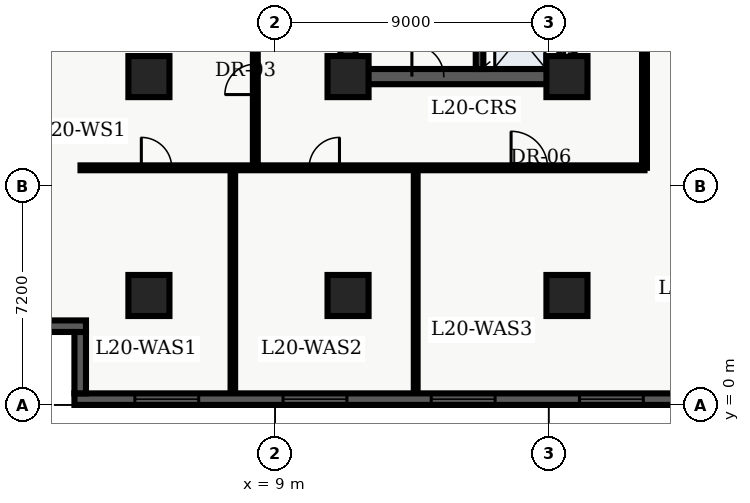
"""IFC4 building model, lengths in metres.
Left out: names, types, materials, properties, quantities, classifications, styles, units other than length and angle.
Written with IfcOpenShell. Run it as: python <this file> out.ifc"""

import sys

from ifc_helpers import new_model, entity, si_unit, converted_unit, direction, frame, origin_with_axes, origin_2d_with_axis, place, context, subcontext, project, spatial, polyline, rectangle, outline, extrude, element, fill, save


model = new_model("IFC4")
c1 = context("Model", 3, precision=1e-05, world=origin_with_axes(), true_north=direction((0.0, 1.0)))
c2 = subcontext(c1, "Body", "Model", "MODEL_VIEW")
j1 = project(units=[si_unit("LENGTHUNIT", "METRE"), converted_unit("PLANEANGLEUNIT", "DEGREE", entity("IfcPlaneAngleMeasure", 0.017), si_unit("PLANEANGLEUNIT", "RADIAN"), dimensions=[0, 0, 0, 0, 0, 0, 0])], contexts=[c1])
p1 = place(None, origin_with_axes())
s1 = spatial("IfcSite", under=j1, at=p1, CompositionType="ELEMENT")
p2 = place(p1, origin_with_axes())
s2 = spatial("IfcBuilding", under=s1, at=p2, CompositionType="ELEMENT")
p3 = place(p2, frame((0.0, 0.0, 84.6), z_axis=(0.0, 0.0, 1.0), x_axis=(1.0, 0.0, 0.0)))
s3 = spatial("IfcBuildingStorey", under=s2, at=p3, CompositionType="ELEMENT", Elevation=84.6)
p4 = place(p3, frame((11.4, 10.8, 0.0), z_axis=(0.0, 0.0, 1.0), x_axis=(0.0, 1.0, 0.0)))
e1 = element("IfcWall", 1, at=p4, inside=s3, PredefinedType="SHEAR", context=c2, shape_type="SweptSolid", body=[
    extrude(outline(polyline([(0.0, -0.25), (27.0, -0.25), (27.0, 0.25), (0.0, 0.25), (0.0, -0.25)])), origin_with_axes(), (0.0, 0.0, 1.0), 4.26),
])
p5 = place(p3, frame((11.4, 10.8, 0.0), z_axis=(0.0, 0.0, 1.0), x_axis=(1.0, 0.0, 0.0)))
e2 = element("IfcWall", 2, at=p5, inside=s3, PredefinedType="SHEAR", context=c2, shape_type="SweptSolid", body=[
    extrude(outline(polyline([(0.0, -0.25), (7.2, -0.25), (7.2, 0.25), (0.0, 0.25), (0.0, -0.25)])), origin_with_axes(), (0.0, 0.0, 1.0), 4.26),
])
p6 = place(p5, frame((2.625, 0.0, 0.0), z_axis=(0.0, 0.0, 1.0), x_axis=(1.0, 0.0, 0.0)))
e3 = element("IfcOpeningElement", 3, at=p6, cuts=e2, PredefinedType="OPENING", context=c2, shape_type="SweptSolid", body=[
    extrude(rectangle(XDim=1.05, YDim=0.52, at=origin_2d_with_axis()), origin_with_axes(), (0.0, 0.0, 1.0), 2.15),
])
p7 = place(p3, frame((18.6, 10.8, 0.0), z_axis=(0.0, 0.0, 1.0), x_axis=(0.0, 1.0, 0.0)))
e4 = element("IfcWall", 4, at=p7, inside=s3, PredefinedType="SHEAR", context=c2, shape_type="SweptSolid", body=[
    extrude(outline(polyline([(0.0, -0.25), (13.5, -0.25), (13.5, 0.25), (0.0, 0.25), (0.0, -0.25)])), origin_with_axes(), (0.0, 0.0, 1.0), 4.26),
])
p8 = place(p7, frame((1.3, 0.0, 0.0), z_axis=(0.0, 0.0, 1.0), x_axis=(1.0, 0.0, 0.0)))
e5 = element("IfcOpeningElement", 5, at=p8, cuts=e4, PredefinedType="OPENING", context=c2, shape_type="SweptSolid", body=[
    extrude(rectangle(XDim=1.1, YDim=0.52, at=origin_2d_with_axis()), origin_with_axes(), (0.0, 0.0, 1.0), 2.15),
])
p9 = place(p7, frame((3.4, 0.0, 0.0), z_axis=(0.0, 0.0, 1.0), x_axis=(1.0, 0.0, 0.0)))
e6 = element("IfcOpeningElement", 6, at=p9, cuts=e4, PredefinedType="OPENING", context=c2, shape_type="SweptSolid", body=[
    extrude(rectangle(XDim=1.1, YDim=0.52, at=origin_2d_with_axis()), origin_with_axes(), (0.0, 0.0, 1.0), 2.15),
])
p10 = place(p7, frame((11.125, 0.0, 0.0), z_axis=(0.0, 0.0, 1.0), x_axis=(1.0, 0.0, 0.0)))
e7 = element("IfcOpeningElement", 7, at=p10, cuts=e4, PredefinedType="OPENING", context=c2, shape_type="SweptSolid", body=[
    extrude(rectangle(XDim=1.05, YDim=0.52, at=origin_2d_with_axis()), origin_with_axes(), (0.0, 0.0, 1.0), 2.15),
])
p11 = place(p3, frame((15.725, 11.05, 0.0), z_axis=(0.0, 0.0, 1.0), x_axis=(0.0, 1.0, 0.0)))
e8 = element("IfcWall", 8, at=p11, inside=s3, PredefinedType="SHEAR", context=c2, shape_type="SweptSolid", body=[
    extrude(outline(polyline([(0.0, -0.125), (8.65, -0.125), (8.65, 0.125), (0.0, 0.125), (0.0, -0.125)])), origin_with_axes(), (0.0, 0.0, 1.0), 4.26),
])
for number, where, z_axis, x_axis in (
    (9, (11.4, 3.6, 0.0), (0.0, 0.0, 1.0), (1.0, 0.0, 0.0)),
    (10, (11.4, 10.8, 0.0), (0.0, 0.0, 1.0), (1.0, 0.0, 0.0)),
    (11, (18.6, 3.6, 0.0), (0.0, 0.0, 1.0), (1.0, 0.0, 0.0)),
    (12, (18.6, 10.8, 0.0), (0.0, 0.0, 1.0), (1.0, 0.0, 0.0)),
    (13, (4.85, 3.6, 0.0), (0.0, 0.0, 1.0), (1.0, 0.0, 0.0)),
    (14, (4.85, 10.8, 0.0), (0.0, 0.0, 1.0), (1.0, 0.0, 0.0)),
):
    element("IfcColumn", number, at=place(p3, frame(where, z_axis=z_axis, x_axis=x_axis)), inside=s3, PredefinedType="COLUMN", context=c2, shape_type="SweptSolid", body=[
        extrude(rectangle(XDim=1.35, YDim=1.35, at=origin_2d_with_axis()), origin_with_axes(), (0.0, 0.0, 1.0), 4.5),
    ])
p12 = place(p3, frame((2.6, 7.8, 0.0), z_axis=(0.0, 0.0, 1.0), x_axis=(1.0, 0.0, 0.0)))
e15 = element("IfcWall", 15, at=p12, inside=s3, PredefinedType="PARTITIONING", context=c2, shape_type="SweptSolid", body=[
    extrude(outline(polyline([(0.0, -0.08), (18.55, -0.08), (18.55, 0.08), (0.0, 0.08), (0.0, -0.08)])), origin_with_axes(), (0.0, 0.0, 1.0), 3.2),
])
p13 = place(p12, frame((2.501, 0.0, 0.0), z_axis=(0.0, 0.0, 1.0), x_axis=(1.0, 0.0, 0.0)))
e16 = element("IfcOpeningElement", 16, at=p13, cuts=e15, PredefinedType="OPENING", context=c2, shape_type="SweptSolid", body=[
    extrude(rectangle(XDim=1.0, YDim=0.18, at=origin_2d_with_axis()), origin_with_axes(), (0.0, 0.0, 1.0), 2.15),
])
p14 = place(p12, frame((8.018, 0.0, 0.0), z_axis=(0.0, 0.0, 1.0), x_axis=(1.0, 0.0, 0.0)))
e17 = element("IfcOpeningElement", 17, at=p14, cuts=e15, PredefinedType="OPENING", context=c2, shape_type="SweptSolid", body=[
    extrude(rectangle(XDim=1.0, YDim=0.18, at=origin_2d_with_axis()), origin_with_axes(), (0.0, 0.0, 1.0), 2.15),
])
p15 = place(p12, frame((14.762, 0.0, 0.0), z_axis=(0.0, 0.0, 1.0), x_axis=(1.0, 0.0, 0.0)))
e18 = element("IfcOpeningElement", 18, at=p15, cuts=e15, PredefinedType="OPENING", context=c2, shape_type="SweptSolid", body=[
    extrude(rectangle(XDim=1.2, YDim=0.18, at=origin_2d_with_axis()), origin_with_axes(), (0.0, 0.0, 1.0), 2.2),
])
p16 = place(p3, frame((21.15, 7.8, 0.0), z_axis=(0.0, 0.0, 1.0), x_axis=(0.0, 1.0, 0.0)))
e19 = element("IfcWall", 19, at=p16, inside=s3, PredefinedType="PARTITIONING", context=c2, shape_type="SweptSolid", body=[
    extrude(outline(polyline([(0.0, -0.08), (32.7, -0.08), (32.7, 0.08), (0.0, 0.08), (0.0, -0.08)])), origin_with_axes(), (0.0, 0.0, 1.0), 3.2),
])
p17 = place(p16, frame((5.775, 0.0, 0.0), z_axis=(0.0, 0.0, 1.0), x_axis=(1.0, 0.0, 0.0)))
e20 = element("IfcOpeningElement", 20, at=p17, cuts=e19, PredefinedType="OPENING", context=c2, shape_type="SweptSolid", body=[
    extrude(rectangle(XDim=1.05, YDim=0.18, at=origin_2d_with_axis()), origin_with_axes(), (0.0, 0.0, 1.0), 2.15),
])
p18 = place(p3, frame((8.35, 7.8, 0.0), z_axis=(0.0, 0.0, 1.0), x_axis=(0.0, 1.0, 0.0)))
e21 = element("IfcWall", 21, at=p18, inside=s3, PredefinedType="PARTITIONING", context=c2, shape_type="SweptSolid", body=[
    extrude(outline(polyline([(0.0, -0.08), (12.6, -0.08), (12.6, 0.08), (0.0, 0.08), (0.0, -0.08)])), origin_with_axes(), (0.0, 0.0, 1.0), 3.2),
])
p19 = place(p18, frame((2.909, 0.0, 0.0), z_axis=(0.0, 0.0, 1.0), x_axis=(1.0, 0.0, 0.0)))
e22 = element("IfcOpeningElement", 22, at=p19, cuts=e21, PredefinedType="OPENING", context=c2, shape_type="SweptSolid", body=[
    extrude(rectangle(XDim=1.0, YDim=0.18, at=origin_2d_with_axis()), origin_with_axes(), (0.0, 0.0, 1.0), 2.15),
])
p20 = place(p18, frame((9.104, 0.0, 0.0), z_axis=(0.0, 0.0, 1.0), x_axis=(1.0, 0.0, 0.0)))
e23 = element("IfcOpeningElement", 23, at=p20, cuts=e21, PredefinedType="OPENING", context=c2, shape_type="SweptSolid", body=[
    extrude(rectangle(XDim=1.0, YDim=0.18, at=origin_2d_with_axis()), origin_with_axes(), (0.0, 0.0, 1.0), 2.15),
])
p21 = place(p3, frame((7.611, 0.36, 0.0), z_axis=(0.0, 0.0, 1.0), x_axis=(0.0, 1.0, 0.0)))
e24 = element("IfcWall", 24, at=p21, inside=s3, PredefinedType="PARTITIONING", context=c2, shape_type="SweptSolid", body=[
    extrude(outline(polyline([(0.0, -0.075), (7.34, -0.075), (7.34, 0.075), (0.0, 0.075), (0.0, -0.075)])), origin_with_axes(), (0.0, 0.0, 1.0), 3.2),
])
p22 = place(p3, frame((13.625, 0.36, 0.0), z_axis=(0.0, 0.0, 1.0), x_axis=(0.0, 1.0, 0.0)))
e25 = element("IfcWall", 25, at=p22, inside=s3, PredefinedType="PARTITIONING", context=c2, shape_type="SweptSolid", body=[
    extrude(outline(polyline([(0.0, -0.062), (7.34, -0.062), (7.34, 0.062), (0.0, 0.062), (0.0, -0.062)])), origin_with_axes(), (0.0, 0.0, 1.0), 3.2),
])
p23 = place(p3, frame((57.22, 0.19, 0.0), z_axis=(0.0, 0.0, 1.0), x_axis=(-1.0, 0.0, 0.0)))
e26 = element("IfcWall", 26, at=p23, inside=s3, PredefinedType="SOLIDWALL", context=c2, shape_type="SweptSolid", body=[
    extrude(outline(polyline([(0.0, -0.19), (54.82, -0.19), (54.82, 0.19), (0.0, 0.19), (0.0, -0.19)])), origin_with_axes(), (0.0, 0.0, 1.0), 4.26),
])
p24 = place(p23, frame((3.037, 0.0, 0.45), z_axis=(0.0, 0.0, 1.0), x_axis=(1.0, 0.0, 0.0)))
e27 = element("IfcOpeningElement", 27, at=p24, cuts=e26, PredefinedType="OPENING", context=c2, shape_type="SweptSolid", body=[
    extrude(rectangle(XDim=2.1, YDim=0.4, at=origin_2d_with_axis()), origin_with_axes(), (0.0, 0.0, 1.0), 2.2),
])
p25 = place(p23, frame((7.912, 0.0, 0.45), z_axis=(0.0, 0.0, 1.0), x_axis=(1.0, 0.0, 0.0)))
e28 = element("IfcOpeningElement", 28, at=p25, cuts=e26, PredefinedType="OPENING", context=c2, shape_type="SweptSolid", body=[
    extrude(rectangle(XDim=2.1, YDim=0.4, at=origin_2d_with_axis()), origin_with_axes(), (0.0, 0.0, 1.0), 2.2),
])
p26 = place(p23, frame((12.786, 0.0, 0.45), z_axis=(0.0, 0.0, 1.0), x_axis=(1.0, 0.0, 0.0)))
e29 = element("IfcOpeningElement", 29, at=p26, cuts=e26, PredefinedType="OPENING", context=c2, shape_type="SweptSolid", body=[
    extrude(rectangle(XDim=2.1, YDim=0.4, at=origin_2d_with_axis()), origin_with_axes(), (0.0, 0.0, 1.0), 2.2),
])
p27 = place(p23, frame((17.661, 0.0, 0.45), z_axis=(0.0, 0.0, 1.0), x_axis=(1.0, 0.0, 0.0)))
e30 = element("IfcOpeningElement", 30, at=p27, cuts=e26, PredefinedType="OPENING", context=c2, shape_type="SweptSolid", body=[
    extrude(rectangle(XDim=2.1, YDim=0.4, at=origin_2d_with_axis()), origin_with_axes(), (0.0, 0.0, 1.0), 2.2),
])
p28 = place(p23, frame((22.535, 0.0, 0.45), z_axis=(0.0, 0.0, 1.0), x_axis=(1.0, 0.0, 0.0)))
e31 = element("IfcOpeningElement", 31, at=p28, cuts=e26, PredefinedType="OPENING", context=c2, shape_type="SweptSolid", body=[
    extrude(rectangle(XDim=2.1, YDim=0.4, at=origin_2d_with_axis()), origin_with_axes(), (0.0, 0.0, 1.0), 2.2),
])
p29 = place(p23, frame((27.41, 0.0, 0.45), z_axis=(0.0, 0.0, 1.0), x_axis=(1.0, 0.0, 0.0)))
e32 = element("IfcOpeningElement", 32, at=p29, cuts=e26, PredefinedType="OPENING", context=c2, shape_type="SweptSolid", body=[
    extrude(rectangle(XDim=2.1, YDim=0.4, at=origin_2d_with_axis()), origin_with_axes(), (0.0, 0.0, 1.0), 2.2),
])
p30 = place(p23, frame((32.285, 0.0, 0.45), z_axis=(0.0, 0.0, 1.0), x_axis=(1.0, 0.0, 0.0)))
e33 = element("IfcOpeningElement", 33, at=p30, cuts=e26, PredefinedType="OPENING", context=c2, shape_type="SweptSolid", body=[
    extrude(rectangle(XDim=2.1, YDim=0.4, at=origin_2d_with_axis()), origin_with_axes(), (0.0, 0.0, 1.0), 2.2),
])
p31 = place(p23, frame((37.159, 0.0, 0.45), z_axis=(0.0, 0.0, 1.0), x_axis=(1.0, 0.0, 0.0)))
e34 = element("IfcOpeningElement", 34, at=p31, cuts=e26, PredefinedType="OPENING", context=c2, shape_type="SweptSolid", body=[
    extrude(rectangle(XDim=2.1, YDim=0.4, at=origin_2d_with_axis()), origin_with_axes(), (0.0, 0.0, 1.0), 2.2),
])
p32 = place(p23, frame((42.034, 0.0, 0.45), z_axis=(0.0, 0.0, 1.0), x_axis=(1.0, 0.0, 0.0)))
e35 = element("IfcOpeningElement", 35, at=p32, cuts=e26, PredefinedType="OPENING", context=c2, shape_type="SweptSolid", body=[
    extrude(rectangle(XDim=2.1, YDim=0.4, at=origin_2d_with_axis()), origin_with_axes(), (0.0, 0.0, 1.0), 2.2),
])
p33 = place(p23, frame((46.908, 0.0, 0.45), z_axis=(0.0, 0.0, 1.0), x_axis=(1.0, 0.0, 0.0)))
e36 = element("IfcOpeningElement", 36, at=p33, cuts=e26, PredefinedType="OPENING", context=c2, shape_type="SweptSolid", body=[
    extrude(rectangle(XDim=2.1, YDim=0.4, at=origin_2d_with_axis()), origin_with_axes(), (0.0, 0.0, 1.0), 2.2),
])
p34 = place(p23, frame((51.783, 0.0, 0.45), z_axis=(0.0, 0.0, 1.0), x_axis=(1.0, 0.0, 0.0)))
e37 = element("IfcOpeningElement", 37, at=p34, cuts=e26, PredefinedType="OPENING", context=c2, shape_type="SweptSolid", body=[
    extrude(rectangle(XDim=2.1, YDim=0.4, at=origin_2d_with_axis()), origin_with_axes(), (0.0, 0.0, 1.0), 2.2),
])
p35 = place(p3, frame((2.59, 0.38, 0.0), z_axis=(0.0, 0.0, 1.0), x_axis=(0.0, 1.0, 0.0)))
e38 = element("IfcWall", 38, at=p35, inside=s3, PredefinedType="SOLIDWALL", context=c2, shape_type="SweptSolid", body=[
    extrude(outline(polyline([(0.0, -0.19), (2.02, -0.19), (2.02, 0.19), (0.0, 0.19), (0.0, -0.19)])), origin_with_axes(), (0.0, 0.0, 1.0), 4.26),
])
p36 = place(p3, frame((2.78, 2.59, 0.0), z_axis=(0.0, 0.0, 1.0), x_axis=(-1.0, 0.0, 0.0)))
e39 = element("IfcWall", 39, at=p36, inside=s3, PredefinedType="SOLIDWALL", context=c2, shape_type="SweptSolid", body=[
    extrude(outline(polyline([(0.0, -0.19), (2.78, -0.19), (2.78, 0.19), (0.0, 0.19), (0.0, -0.19)])), origin_with_axes(), (0.0, 0.0, 1.0), 4.26),
])
p37 = place(p7, frame((1.3, 0.0, 0.0), z_axis=(0.0, 0.0, 1.0), x_axis=(1.0, 0.0, 0.0)))
e40 = element("IfcDoor", 40, at=p37, inside=s3, OperationType="SLIDING_TO_LEFT", PredefinedType="DOOR", context=c2, shape_type="SweptSolid", body=[
    extrude(rectangle(XDim=1.1, YDim=0.09, at=origin_2d_with_axis()), origin_with_axes(), (0.0, 0.0, 1.0), 2.15),
])
fill(e5, e40)
p38 = place(p5, frame((2.625, 0.0, 0.0), z_axis=(0.0, 0.0, 1.0), x_axis=(1.0, 0.0, 0.0)))
e41 = element("IfcDoor", 41, at=p38, inside=s3, OperationType="SINGLE_SWING_LEFT", PredefinedType="DOOR", context=c2, shape_type="SweptSolid", body=[
    extrude(rectangle(XDim=1.05, YDim=0.09, at=origin_2d_with_axis()), origin_with_axes(), (0.0, 0.0, 1.0), 2.15),
])
fill(e3, e41)
p39 = place(p18, frame((2.909, 0.0, 0.0), z_axis=(0.0, 0.0, 1.0), x_axis=(1.0, 0.0, 0.0)))
e42 = element("IfcDoor", 42, at=p39, inside=s3, OperationType="SINGLE_SWING_LEFT", PredefinedType="DOOR", context=c2, shape_type="SweptSolid", body=[
    extrude(rectangle(XDim=1.0, YDim=0.09, at=origin_2d_with_axis()), origin_with_axes(), (0.0, 0.0, 1.0), 2.15),
])
fill(e22, e42)
p40 = place(p12, frame((2.501, 0.0, 0.0), z_axis=(0.0, 0.0, 1.0), x_axis=(1.0, 0.0, 0.0)))
e43 = element("IfcDoor", 43, at=p40, inside=s3, OperationType="SINGLE_SWING_LEFT", PredefinedType="DOOR", context=c2, shape_type="SweptSolid", body=[
    extrude(rectangle(XDim=1.0, YDim=0.09, at=origin_2d_with_axis()), origin_with_axes(), (0.0, 0.0, 1.0), 2.15),
])
fill(e16, e43)
p41 = place(p12, frame((8.018, 0.0, 0.0), z_axis=(0.0, 0.0, 1.0), x_axis=(1.0, 0.0, 0.0)))
e44 = element("IfcDoor", 44, at=p41, inside=s3, OperationType="SINGLE_SWING_RIGHT", PredefinedType="DOOR", context=c2, shape_type="SweptSolid", body=[
    extrude(rectangle(XDim=1.0, YDim=0.09, at=origin_2d_with_axis()), origin_with_axes(), (0.0, 0.0, 1.0), 2.15),
])
fill(e17, e44)
p42 = place(p12, frame((14.762, 0.0, 0.0), z_axis=(0.0, 0.0, 1.0), x_axis=(1.0, 0.0, 0.0)))
e45 = element("IfcDoor", 45, at=p42, inside=s3, OperationType="SINGLE_SWING_LEFT", PredefinedType="DOOR", context=c2, shape_type="SweptSolid", body=[
    extrude(rectangle(XDim=1.2, YDim=0.09, at=origin_2d_with_axis()), origin_with_axes(), (0.0, 0.0, 1.0), 2.2),
])
fill(e18, e45)
p43 = place(p23, frame((37.159, 0.0, 0.45), z_axis=(0.0, 0.0, 1.0), x_axis=(1.0, 0.0, 0.0)))
e46 = element("IfcWindow", 46, at=p43, inside=s3, PredefinedType="WINDOW", context=c2, shape_type="SweptSolid", body=[
    extrude(rectangle(XDim=2.1, YDim=0.09, at=origin_2d_with_axis()), origin_with_axes(), (0.0, 0.0, 1.0), 2.2),
])
fill(e34, e46)
p44 = place(p23, frame((42.034, 0.0, 0.45), z_axis=(0.0, 0.0, 1.0), x_axis=(1.0, 0.0, 0.0)))
e47 = element("IfcWindow", 47, at=p44, inside=s3, PredefinedType="WINDOW", context=c2, shape_type="SweptSolid", body=[
    extrude(rectangle(XDim=2.1, YDim=0.09, at=origin_2d_with_axis()), origin_with_axes(), (0.0, 0.0, 1.0), 2.2),
])
fill(e35, e47)
p45 = place(p23, frame((46.908, 0.0, 0.45), z_axis=(0.0, 0.0, 1.0), x_axis=(1.0, 0.0, 0.0)))
e48 = element("IfcWindow", 48, at=p45, inside=s3, PredefinedType="WINDOW", context=c2, shape_type="SweptSolid", body=[
    extrude(rectangle(XDim=2.1, YDim=0.09, at=origin_2d_with_axis()), origin_with_axes(), (0.0, 0.0, 1.0), 2.2),
])
fill(e36, e48)
p46 = place(p23, frame((51.783, 0.0, 0.45), z_axis=(0.0, 0.0, 1.0), x_axis=(1.0, 0.0, 0.0)))
e49 = element("IfcWindow", 49, at=p46, inside=s3, PredefinedType="WINDOW", context=c2, shape_type="SweptSolid", body=[
    extrude(rectangle(XDim=2.1, YDim=0.09, at=origin_2d_with_axis()), origin_with_axes(), (0.0, 0.0, 1.0), 2.2),
])
fill(e37, e49)
save(model, sys.argv[1])
